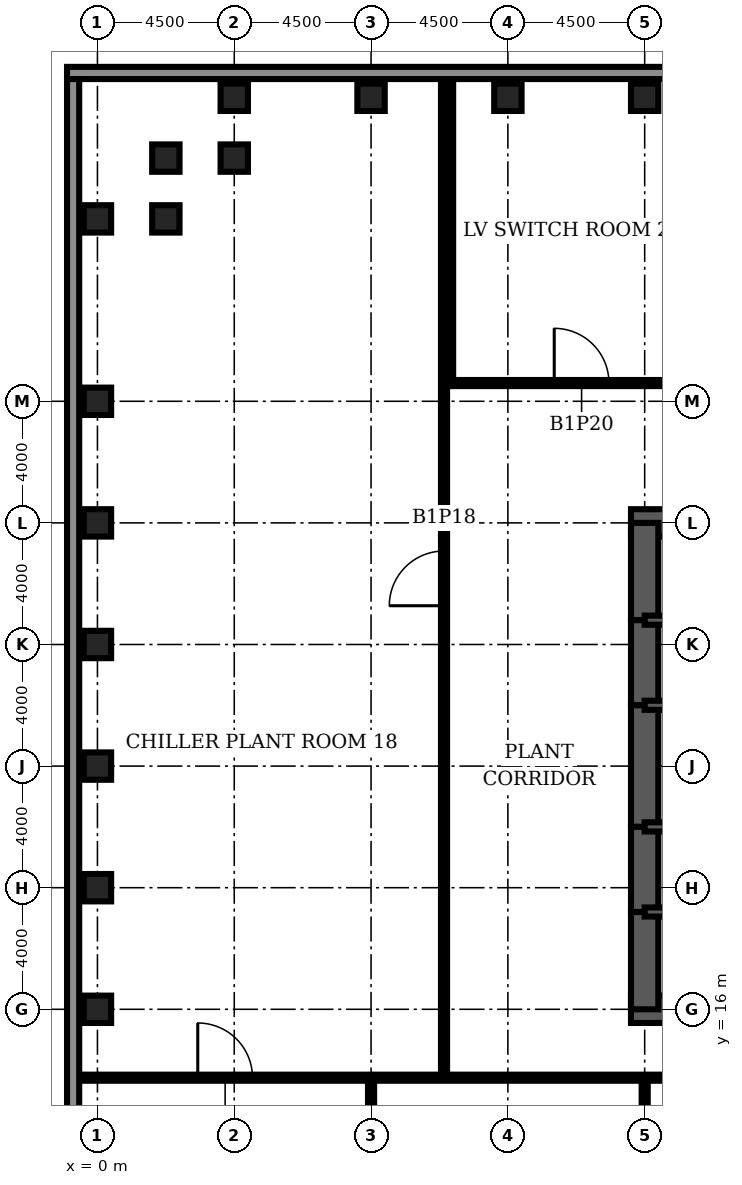
"""IFC4 building model, lengths in metres.
Left out: names, types, materials, properties, quantities, classifications, styles, units other than length and angle.
Written with IfcOpenShell. Run it as: python <this file> out.ifc"""

import sys

from ifc_helpers import new_model, si_unit, direction, frame, frame_2d, origin, origin_2d, place, context, subcontext, project, spatial, rectangle, hollow_rectangle, extrude, element, fill, save


model = new_model("IFC4")
c1 = context("Model", 3, precision=1e-05, world=origin(), true_north=direction((0.0, 1.0)))
c2 = subcontext(c1, "Body", "Model", "MODEL_VIEW")
j1 = project(units=[si_unit("LENGTHUNIT", "METRE"), si_unit("PLANEANGLEUNIT", "RADIAN")], contexts=[c1])
p1 = place(None, origin())
s1 = spatial("IfcSite", under=j1, at=p1, CompositionType="ELEMENT")
p2 = place(p1, origin())
s2 = spatial("IfcBuilding", under=s1, at=p2, CompositionType="ELEMENT")
p3 = place(p2, frame((0.0, 0.0, -6.0)))
s3 = spatial("IfcBuildingStorey", under=s2, at=p3, CompositionType="ELEMENT", Elevation=-6.0)
for number, where, z_axis, x_axis in (
    (1, (18.0, 46.0, 0.0), (0.0, 0.0, 1.0), (0.0, 1.0, 0.0)),
    (2, (13.5, 46.0, 0.0), (0.0, 0.0, 1.0), (0.0, 1.0, 0.0)),
    (3, (9.0, 46.0, 0.0), (0.0, 0.0, 1.0), (0.0, 1.0, 0.0)),
    (4, (4.5, 46.0, 0.0), (0.0, 0.0, 1.0), (0.0, 1.0, 0.0)),
    (5, (4.5, 44.0, 0.0), (0.0, 0.0, 1.0), (0.0, 1.0, 0.0)),
    (6, (2.25, 44.0, 0.0), (0.0, 0.0, 1.0), (1.0, 0.0, 0.0)),
    (7, (2.25, 42.0, 0.0), (0.0, 0.0, 1.0), (1.0, 0.0, 0.0)),
    (8, (0.0, 42.0, 0.0), (0.0, 0.0, 1.0), (1.0, 0.0, 0.0)),
    (9, (0.0, 36.0, 0.0), (0.0, 0.0, 1.0), (1.0, 0.0, 0.0)),
    (10, (0.0, 32.0, 0.0), (0.0, 0.0, 1.0), (1.0, 0.0, 0.0)),
    (11, (0.0, 28.0, 0.0), (0.0, 0.0, 1.0), (1.0, 0.0, 0.0)),
    (12, (0.0, 24.0, 0.0), (0.0, 0.0, 1.0), (1.0, 0.0, 0.0)),
    (13, (0.0, 20.0, 0.0), (0.0, 0.0, 1.0), (1.0, 0.0, 0.0)),
    (14, (0.0, 16.0, 0.0), (0.0, 0.0, 1.0), (1.0, 0.0, 0.0)),
):
    element("IfcColumn", number, at=place(p3, frame(where, z_axis=z_axis, x_axis=x_axis)), inside=s3, PredefinedType="COLUMN", context=c2, shape_type="SweptSolid", body=[
        extrude(hollow_rectangle(XDim=0.9, YDim=0.9, WallThickness=0.12, at=origin_2d()), origin(), (0.0, 0.0, 1.0), 6.0),
    ])
for number, where, z_axis, x_axis in (
    (15, (17.55, 16.0, 0.0), (0.0, 0.0, 1.0), (1.0, 0.0, 0.0)),
    (16, (27.0, 32.0, 0.0), (0.0, 0.0, 1.0), (-1.0, 0.0, 0.0)),
):
    element("IfcWall", number, at=place(p3, frame(where, z_axis=z_axis, x_axis=x_axis)), inside=s3, PredefinedType="SHEAR", context=c2, shape_type="SweptSolid", body=[
        extrude(rectangle(XDim=9.45, YDim=0.9, at=frame_2d((4.725, 0.0))), origin(), (0.0, 0.0, 1.0), 6.0),
    ])
p4 = place(p3, frame((18.0, 32.0, 0.0), z_axis=(0.0, 0.0, 1.0), x_axis=(0.0, -1.0, 0.0)))
e17 = element("IfcWall", 17, at=p4, inside=s3, PredefinedType="SHEAR", context=c2, shape_type="SweptSolid", body=[
    extrude(rectangle(XDim=3.2, YDim=0.9, at=frame_2d((1.6, 0.0))), origin(), (0.0, 0.0, 1.0), 6.0),
])
p5 = place(p3, frame((18.0, 28.8, 0.0), z_axis=(0.0, 0.0, 1.0), x_axis=(0.0, -1.0, 0.0)))
e18 = element("IfcWall", 18, at=p5, inside=s3, PredefinedType="SHEAR", context=c2, shape_type="SweptSolid", body=[
    extrude(rectangle(XDim=2.8, YDim=0.9, at=frame_2d((1.4, 0.0))), origin(), (0.0, 0.0, 1.0), 6.0),
])
p6 = place(p5, frame((0.4, 0.0, 0.0)))
e19 = element("IfcOpeningElement", 19, at=p6, cuts=e18, PredefinedType="OPENING", context=c2, shape_type="SweptSolid", body=[
    extrude(rectangle(XDim=1.8, YDim=2.1, at=frame_2d((0.9, 1.05))), frame((0.0, 0.46, 0.0), z_axis=(0.0, -1.0, 0.0), x_axis=(1.0, 0.0, 0.0)), (0.0, 0.0, 1.0), 0.92),
])
p7 = place(p3, frame((18.0, 26.0, 0.0), z_axis=(0.0, 0.0, 1.0), x_axis=(0.0, -1.0, 0.0)))
e20 = element("IfcWall", 20, at=p7, inside=s3, PredefinedType="SHEAR", context=c2, shape_type="SweptSolid", body=[
    extrude(rectangle(XDim=4.0, YDim=0.9, at=frame_2d((2.0, 0.0))), origin(), (0.0, 0.0, 1.0), 6.0),
])
p8 = place(p3, frame((18.0, 22.0, 0.0), z_axis=(0.0, 0.0, 1.0), x_axis=(0.0, -1.0, 0.0)))
e21 = element("IfcWall", 21, at=p8, inside=s3, PredefinedType="SHEAR", context=c2, shape_type="SweptSolid", body=[
    extrude(rectangle(XDim=2.8, YDim=0.9, at=frame_2d((1.4, 0.0))), origin(), (0.0, 0.0, 1.0), 6.0),
])
p9 = place(p8, frame((0.6, 0.0, 0.0)))
e22 = element("IfcOpeningElement", 22, at=p9, cuts=e21, PredefinedType="OPENING", context=c2, shape_type="SweptSolid", body=[
    extrude(rectangle(XDim=1.8, YDim=2.1, at=frame_2d((0.9, 1.05))), frame((0.0, 0.46, 0.0), z_axis=(0.0, -1.0, 0.0), x_axis=(1.0, 0.0, 0.0)), (0.0, 0.0, 1.0), 0.92),
])
p10 = place(p3, frame((18.0, 19.2, 0.0), z_axis=(0.0, 0.0, 1.0), x_axis=(0.0, -1.0, 0.0)))
e23 = element("IfcWall", 23, at=p10, inside=s3, PredefinedType="SHEAR", context=c2, shape_type="SweptSolid", body=[
    extrude(rectangle(XDim=3.2, YDim=0.9, at=frame_2d((1.6, 0.0))), origin(), (0.0, 0.0, 1.0), 6.0),
])
p11 = place(p3, frame((18.0, 19.2, 0.0), z_axis=(0.0, 0.0, 1.0), x_axis=(1.0, 0.0, 0.0)))
e24 = element("IfcWall", 24, at=p11, inside=s3, PredefinedType="SOLIDWALL", context=c2, shape_type="SweptSolid", body=[
    extrude(rectangle(XDim=9.0, YDim=0.3, at=frame_2d((4.5, 0.0))), origin(), (0.0, 0.0, 1.0), 6.0),
])
p12 = place(p11, frame((0.65, 0.0, 0.0)))
e25 = element("IfcOpeningElement", 25, at=p12, cuts=e24, PredefinedType="OPENING", context=c2, shape_type="SweptSolid", body=[
    extrude(rectangle(XDim=1.0, YDim=2.1, at=frame_2d((0.5, 1.05))), frame((0.0, 0.16, 0.0), z_axis=(0.0, -1.0, 0.0), x_axis=(1.0, 0.0, 0.0)), (0.0, 0.0, 1.0), 0.32),
])
p13 = place(p3, frame((18.0, 28.8, 0.0), z_axis=(0.0, 0.0, 1.0), x_axis=(1.0, 0.0, 0.0)))
e26 = element("IfcWall", 26, at=p13, inside=s3, PredefinedType="SOLIDWALL", context=c2, shape_type="SweptSolid", body=[
    extrude(rectangle(XDim=9.0, YDim=0.3, at=frame_2d((4.5, 0.0))), origin(), (0.0, 0.0, 1.0), 6.0),
])
p14 = place(p13, frame((0.65, 0.0, 0.0)))
e27 = element("IfcOpeningElement", 27, at=p14, cuts=e26, PredefinedType="OPENING", context=c2, shape_type="SweptSolid", body=[
    extrude(rectangle(XDim=1.0, YDim=2.1, at=frame_2d((0.5, 1.05))), frame((0.0, 0.16, 0.0), z_axis=(0.0, -1.0, 0.0), x_axis=(1.0, 0.0, 0.0)), (0.0, 0.0, 1.0), 0.32),
])
p15 = place(p3, frame((18.0, 22.0, 0.0), z_axis=(0.0, 0.0, 1.0), x_axis=(1.0, 0.0, 0.0)))
e28 = element("IfcWall", 28, at=p15, inside=s3, PredefinedType="SOLIDWALL", context=c2, shape_type="SweptSolid", body=[
    extrude(rectangle(XDim=6.0, YDim=0.3, at=frame_2d((3.0, 0.0))), origin(), (0.0, 0.0, 1.0), 6.0),
])
p16 = place(p15, frame((2.0, 0.0, 0.0)))
e29 = element("IfcOpeningElement", 29, at=p16, cuts=e28, PredefinedType="OPENING", context=c2, shape_type="SweptSolid", body=[
    extrude(rectangle(XDim=1.0, YDim=2.1, at=frame_2d((0.5, 1.05))), frame((0.0, 0.16, 0.0), z_axis=(0.0, -1.0, 0.0), x_axis=(1.0, 0.0, 0.0)), (0.0, 0.0, 1.0), 0.32),
])
p17 = place(p3, frame((18.0, 26.0, 0.0), z_axis=(0.0, 0.0, 1.0), x_axis=(1.0, 0.0, 0.0)))
e30 = element("IfcWall", 30, at=p17, inside=s3, PredefinedType="SOLIDWALL", context=c2, shape_type="SweptSolid", body=[
    extrude(rectangle(XDim=6.0, YDim=0.3, at=frame_2d((3.0, 0.0))), origin(), (0.0, 0.0, 1.0), 6.0),
])
p18 = place(p3, frame((-0.59, 13.75, 0.0), z_axis=(0.0, 0.0, 1.0), x_axis=(1.0, 0.0, 0.0)))
e31 = element("IfcWall", 31, at=p18, inside=s3, PredefinedType="PARTITIONING", context=c2, shape_type="SweptSolid", body=[
    extrude(rectangle(XDim=27.59, YDim=0.2, at=frame_2d((13.795, 0.0))), origin(), (0.0, 0.0, 1.0), 5.7),
])
p19 = place(p18, frame((3.89, 0.0, 0.0)))
e32 = element("IfcOpeningElement", 32, at=p19, cuts=e31, PredefinedType="OPENING", context=c2, shape_type="SweptSolid", body=[
    extrude(rectangle(XDim=1.8, YDim=2.1, at=frame_2d((0.9, 1.05))), frame((0.0, 0.11, 0.0), z_axis=(0.0, -1.0, 0.0), x_axis=(1.0, 0.0, 0.0)), (0.0, 0.0, 1.0), 0.22),
])
p20 = place(p3, frame((11.6, 36.6, 0.0), z_axis=(0.0, 0.0, 1.0), x_axis=(1.0, 0.0, 0.0)))
e33 = element("IfcWall", 33, at=p20, inside=s3, PredefinedType="PARTITIONING", context=c2, shape_type="SweptSolid", body=[
    extrude(rectangle(XDim=48.8, YDim=0.2, at=frame_2d((24.4, 0.0))), origin(), (0.0, 0.0, 1.0), 5.7),
])
p21 = place(p20, frame((3.425, 0.0, 0.0)))
e34 = element("IfcOpeningElement", 34, at=p21, cuts=e33, PredefinedType="OPENING", context=c2, shape_type="SweptSolid", body=[
    extrude(rectangle(XDim=1.8, YDim=2.1, at=frame_2d((0.9, 1.05))), frame((0.0, 0.11, 0.0), z_axis=(0.0, -1.0, 0.0), x_axis=(1.0, 0.0, 0.0)), (0.0, 0.0, 1.0), 0.22),
])
p22 = place(p20, frame((29.125, 0.0, 0.0)))
e35 = element("IfcOpeningElement", 35, at=p22, cuts=e33, PredefinedType="OPENING", context=c2, shape_type="SweptSolid", body=[
    extrude(rectangle(XDim=1.8, YDim=2.1, at=frame_2d((0.9, 1.05))), frame((0.0, 0.11, 0.0), z_axis=(0.0, -1.0, 0.0), x_axis=(1.0, 0.0, 0.0)), (0.0, 0.0, 1.0), 0.22),
])
p23 = place(p20, frame((40.2, 0.0, 0.0)))
e36 = element("IfcOpeningElement", 36, at=p23, cuts=e33, PredefinedType="OPENING", context=c2, shape_type="SweptSolid", body=[
    extrude(rectangle(XDim=1.8, YDim=2.1, at=frame_2d((0.9, 1.05))), frame((0.0, 0.11, 0.0), z_axis=(0.0, -1.0, 0.0), x_axis=(1.0, 0.0, 0.0)), (0.0, 0.0, 1.0), 0.22),
])
p24 = place(p20, frame((16.75, 0.0, 0.0)))
e37 = element("IfcOpeningElement", 37, at=p24, cuts=e33, PredefinedType="OPENING", context=c2, shape_type="SweptSolid", body=[
    extrude(rectangle(XDim=1.8, YDim=2.1, at=frame_2d((0.9, 1.05))), frame((0.0, 0.11, 0.0), z_axis=(0.0, -1.0, 0.0), x_axis=(1.0, 0.0, 0.0)), (0.0, 0.0, 1.0), 0.22),
])
p25 = place(p3, frame((9.0, 1.75, 0.0), z_axis=(0.0, 0.0, 1.0), x_axis=(0.0, 1.0, 0.0)))
e38 = element("IfcWall", 38, at=p25, inside=s3, PredefinedType="PARTITIONING", context=c2, shape_type="SweptSolid", body=[
    extrude(rectangle(XDim=12.0, YDim=0.2, at=frame_2d((6.0, 0.0))), origin(), (0.0, 0.0, 1.0), 5.7),
])
p26 = place(p3, frame((11.4, 13.75, 0.0), z_axis=(0.0, 0.0, 1.0), x_axis=(0.0, 1.0, 0.0)))
e39 = element("IfcWall", 39, at=p26, inside=s3, PredefinedType="PARTITIONING", context=c2, shape_type="SweptSolid", body=[
    extrude(rectangle(XDim=32.84, YDim=0.2, at=frame_2d((16.42, 0.0))), origin(), (0.0, 0.0, 1.0), 5.7),
])
p27 = place(p26, frame((15.525, 0.0, 0.0)))
e40 = element("IfcOpeningElement", 40, at=p27, cuts=e39, PredefinedType="OPENING", context=c2, shape_type="SweptSolid", body=[
    extrude(rectangle(XDim=1.8, YDim=2.1, at=frame_2d((0.9, 1.05))), frame((0.0, 0.11, 0.0), z_axis=(0.0, -1.0, 0.0), x_axis=(1.0, 0.0, 0.0)), (0.0, 0.0, 1.0), 0.22),
])
p28 = place(p3, frame((11.6, 36.6, 0.0), z_axis=(0.0, 0.0, 1.0), x_axis=(0.0, 1.0, 0.0)))
e41 = element("IfcWall", 41, at=p28, inside=s3, PredefinedType="PARTITIONING", context=c2, shape_type="SweptSolid", body=[
    extrude(rectangle(XDim=9.99, YDim=0.2, at=frame_2d((4.995, 0.0))), origin(), (0.0, 0.0, 1.0), 5.7),
])
p29 = place(p3, frame((18.0, 1.75, 0.0), z_axis=(0.0, 0.0, 1.0), x_axis=(0.0, 1.0, 0.0)))
e42 = element("IfcWall", 42, at=p29, inside=s3, PredefinedType="PARTITIONING", context=c2, shape_type="SweptSolid", body=[
    extrude(rectangle(XDim=12.0, YDim=0.2, at=frame_2d((6.0, 0.0))), origin(), (0.0, 0.0, 1.0), 5.7),
])
p30 = place(p3, frame((73.0, 46.8, 0.0), z_axis=(0.0, 0.0, 1.0), x_axis=(-1.0, 0.0, 0.0)))
e43 = element("IfcWall", 43, at=p30, inside=s3, PredefinedType="SOLIDWALL", context=c2, shape_type="SweptSolid", body=[
    extrude(rectangle(XDim=74.0, YDim=0.4, at=frame_2d((37.0, 0.0))), origin(), (0.0, 0.0, 1.0), 5.7),
])
p31 = place(p3, frame((-0.8, 46.6, 0.0), z_axis=(0.0, 0.0, 1.0), x_axis=(0.0, -1.0, 0.0)))
e44 = element("IfcWall", 44, at=p31, inside=s3, PredefinedType="SOLIDWALL", context=c2, shape_type="SweptSolid", body=[
    extrude(rectangle(XDim=67.9, YDim=0.4, at=frame_2d((33.95, 0.0))), origin(), (0.0, 0.0, 1.0), 5.7),
])
p32 = place(p19, origin())
e45 = element("IfcDoor", 45, at=p32, inside=s3, OperationType="SINGLE_SWING_LEFT", PredefinedType="DOOR", context=c2, shape_type="SweptSolid", body=[
    extrude(rectangle(XDim=1.8, YDim=2.1, at=frame_2d((0.9, 1.05))), frame((0.0, 0.025, 0.0), z_axis=(0.0, -1.0, 0.0), x_axis=(1.0, 0.0, 0.0)), (0.0, 0.0, 1.0), 0.05),
])
fill(e32, e45)
p33 = place(p27, origin())
e46 = element("IfcDoor", 46, at=p33, inside=s3, OperationType="SINGLE_SWING_LEFT", PredefinedType="DOOR", context=c2, shape_type="SweptSolid", body=[
    extrude(rectangle(XDim=1.8, YDim=2.1, at=frame_2d((0.9, 1.05))), frame((0.0, 0.025, 0.0), z_axis=(0.0, -1.0, 0.0), x_axis=(1.0, 0.0, 0.0)), (0.0, 0.0, 1.0), 0.05),
])
fill(e40, e46)
p34 = place(p21, origin())
e47 = element("IfcDoor", 47, at=p34, inside=s3, OperationType="SINGLE_SWING_LEFT", PredefinedType="DOOR", context=c2, shape_type="SweptSolid", body=[
    extrude(rectangle(XDim=1.8, YDim=2.1, at=frame_2d((0.9, 1.05))), frame((0.0, 0.025, 0.0), z_axis=(0.0, -1.0, 0.0), x_axis=(1.0, 0.0, 0.0)), (0.0, 0.0, 1.0), 0.05),
])
fill(e34, e47)
p35 = place(p9, origin())
e48 = element("IfcDoor", 48, at=p35, inside=s3, OperationType="SINGLE_SWING_LEFT", PredefinedType="DOOR", context=c2, shape_type="SweptSolid", body=[
    extrude(rectangle(XDim=1.8, YDim=2.1, at=frame_2d((0.9, 1.05))), frame((0.0, 0.45, 0.0), z_axis=(0.0, -1.0, 0.0), x_axis=(1.0, 0.0, 0.0)), (0.0, 0.0, 1.0), 0.899),
])
fill(e22, e48)
p36 = place(p6, origin())
e49 = element("IfcDoor", 49, at=p36, inside=s3, OperationType="SINGLE_SWING_LEFT", PredefinedType="DOOR", context=c2, shape_type="SweptSolid", body=[
    extrude(rectangle(XDim=1.8, YDim=2.1, at=frame_2d((0.9, 1.05))), frame((0.0, 0.45, 0.0), z_axis=(0.0, -1.0, 0.0), x_axis=(1.0, 0.0, 0.0)), (0.0, 0.0, 1.0), 0.899),
])
fill(e19, e49)
save(model, sys.argv[1])
